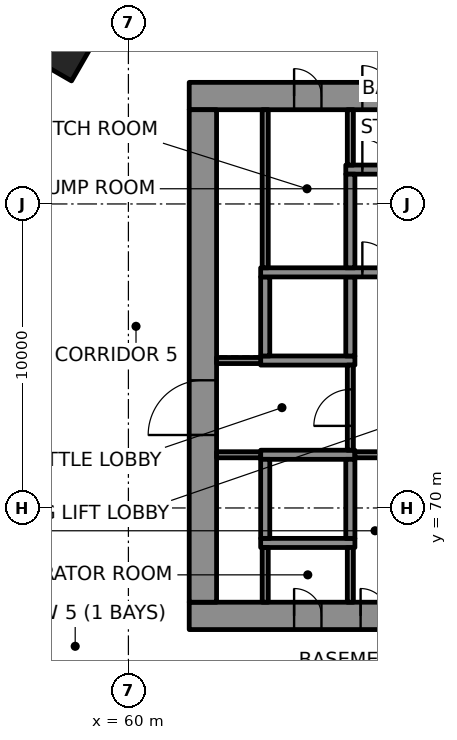
"""IFC4 building model, lengths in metres.
Left out: names, types, materials, properties, quantities, classifications, styles, units other than length and angle.
Written with IfcOpenShell. Run it as: python <this file> out.ifc"""

import sys

from ifc_helpers import new_model, si_unit, direction, frame, frame_2d, origin, origin_2d, place, context, subcontext, project, spatial, rectangle, extrude, element, fill, save


model = new_model("IFC4")
c1 = context("Model", 3, precision=1e-05, world=origin(), true_north=direction((0.0, 1.0)))
c2 = subcontext(c1, "Body", "Model", "MODEL_VIEW")
j1 = project(units=[si_unit("LENGTHUNIT", "METRE"), si_unit("PLANEANGLEUNIT", "RADIAN")], contexts=[c1])
p1 = place(None, origin())
s1 = spatial("IfcSite", under=j1, at=p1, CompositionType="ELEMENT")
p2 = place(p1, origin())
s2 = spatial("IfcBuilding", under=s1, at=p2, CompositionType="ELEMENT")
p3 = place(p2, frame((0.0, 0.0, -5.0)))
s3 = spatial("IfcBuildingStorey", under=s2, at=p3, CompositionType="ELEMENT", Elevation=-5.0)
p4 = place(p3, frame((67.936, 110.334, -0.35), z_axis=(0.0, 0.0, 1.0), x_axis=(-0.499999089162, -0.866025929656, 0.0)))
e1 = element("IfcWall", 1, at=p4, inside=s3, PredefinedType="SOLIDWALL", context=c2, shape_type="SweptSolid", body=[
    extrude(rectangle(XDim=53.501, YDim=0.6, at=frame_2d((26.751, 0.0))), origin(), (0.0, 0.0, 1.0), 5.05),
])
p5 = place(p3, frame((57.78, 84.942, 0.0), z_axis=(0.0, 0.0, 1.0), x_axis=(-0.5, -0.866025403784, 0.0)))
e2 = element("IfcColumn", 2, at=p5, inside=s3, PredefinedType="COLUMN", context=c2, shape_type="SweptSolid", body=[
    extrude(rectangle(XDim=1.2, YDim=1.5, at=origin_2d()), origin(), (0.0, 0.0, 1.0), 5.0),
])
p6 = place(p3, frame((62.0, 66.45, 0.0), z_axis=(0.0, 0.0, 1.0), x_axis=(1.0, 0.0, 0.0)))
e3 = element("IfcWall", 3, at=p6, inside=s3, PredefinedType="SHEAR", context=c2, shape_type="SweptSolid", body=[
    extrude(rectangle(XDim=26.0, YDim=0.9, at=frame_2d((13.0, 0.0))), origin(), (0.0, 0.0, 1.0), 4.7),
])
p7 = place(p6, frame((3.45, 0.0, 0.0)))
e4 = element("IfcOpeningElement", 4, at=p7, cuts=e3, PredefinedType="OPENING", context=c2, shape_type="SweptSolid", body=[
    extrude(rectangle(XDim=0.9, YDim=2.1, at=frame_2d((0.45, 1.05))), frame((0.0, 0.46, 0.0), z_axis=(0.0, -1.0, 0.0), x_axis=(1.0, 0.0, 0.0)), (0.0, 0.0, 1.0), 0.92),
])
p8 = place(p6, frame((5.637, 0.0, 0.0)))
e5 = element("IfcOpeningElement", 5, at=p8, cuts=e3, PredefinedType="OPENING", context=c2, shape_type="SweptSolid", body=[
    extrude(rectangle(XDim=0.9, YDim=2.1, at=frame_2d((0.45, 1.05))), frame((0.0, 0.46, 0.0), z_axis=(0.0, -1.0, 0.0), x_axis=(1.0, 0.0, 0.0)), (0.0, 0.0, 1.0), 0.92),
])
p9 = place(p6, frame((7.212, 0.0, 0.0)))
e6 = element("IfcOpeningElement", 6, at=p9, cuts=e3, PredefinedType="OPENING", context=c2, shape_type="SweptSolid", body=[
    extrude(rectangle(XDim=0.9, YDim=2.1, at=frame_2d((0.45, 1.05))), frame((0.0, 0.46, 0.0), z_axis=(0.0, -1.0, 0.0), x_axis=(1.0, 0.0, 0.0)), (0.0, 0.0, 1.0), 0.92),
])
p10 = place(p6, frame((8.999, 0.0, 0.0)))
e7 = element("IfcOpeningElement", 7, at=p10, cuts=e3, PredefinedType="OPENING", context=c2, shape_type="SweptSolid", body=[
    extrude(rectangle(XDim=0.9, YDim=2.1, at=frame_2d((0.45, 1.05))), frame((0.0, 0.46, 0.0), z_axis=(0.0, -1.0, 0.0), x_axis=(1.0, 0.0, 0.0)), (0.0, 0.0, 1.0), 0.92),
])
p11 = place(p6, frame((17.324, 0.0, 0.0)))
e8 = element("IfcOpeningElement", 8, at=p11, cuts=e3, PredefinedType="OPENING", context=c2, shape_type="SweptSolid", body=[
    extrude(rectangle(XDim=0.9, YDim=2.1, at=frame_2d((0.45, 1.05))), frame((0.0, 0.46, 0.0), z_axis=(0.0, -1.0, 0.0), x_axis=(1.0, 0.0, 0.0)), (0.0, 0.0, 1.0), 0.92),
])
p12 = place(p3, frame((62.0, 83.55, 0.0), z_axis=(0.0, 0.0, 1.0), x_axis=(1.0, 0.0, 0.0)))
e9 = element("IfcWall", 9, at=p12, inside=s3, PredefinedType="SHEAR", context=c2, shape_type="SweptSolid", body=[
    extrude(rectangle(XDim=26.0, YDim=0.9, at=frame_2d((13.0, 0.0))), origin(), (0.0, 0.0, 1.0), 4.7),
])
p13 = place(p12, frame((5.695, 0.0, 0.0)))
e10 = element("IfcOpeningElement", 10, at=p13, cuts=e9, PredefinedType="OPENING", context=c2, shape_type="SweptSolid", body=[
    extrude(rectangle(XDim=1.0, YDim=2.1, at=frame_2d((0.5, 1.05))), frame((0.0, 0.46, 0.0), z_axis=(0.0, -1.0, 0.0), x_axis=(1.0, 0.0, 0.0)), (0.0, 0.0, 1.0), 0.92),
])
p14 = place(p12, frame((19.505, 0.0, 0.0)))
e11 = element("IfcOpeningElement", 11, at=p14, cuts=e9, PredefinedType="OPENING", context=c2, shape_type="SweptSolid", body=[
    extrude(rectangle(XDim=1.0, YDim=2.1, at=frame_2d((0.5, 1.05))), frame((0.0, 0.46, 0.0), z_axis=(0.0, -1.0, 0.0), x_axis=(1.0, 0.0, 0.0)), (0.0, 0.0, 1.0), 0.92),
])
p15 = place(p12, frame((3.45, 0.0, 0.0)))
e12 = element("IfcOpeningElement", 12, at=p15, cuts=e9, PredefinedType="OPENING", context=c2, shape_type="SweptSolid", body=[
    extrude(rectangle(XDim=0.9, YDim=2.1, at=frame_2d((0.45, 1.05))), frame((0.0, 0.46, 0.0), z_axis=(0.0, -1.0, 0.0), x_axis=(1.0, 0.0, 0.0)), (0.0, 0.0, 1.0), 0.92),
])
p16 = place(p12, frame((12.65, 0.0, 0.0)))
e13 = element("IfcOpeningElement", 13, at=p16, cuts=e9, PredefinedType="OPENING", context=c2, shape_type="SweptSolid", body=[
    extrude(rectangle(XDim=0.9, YDim=2.1, at=frame_2d((0.45, 1.05))), frame((0.0, 0.46, 0.0), z_axis=(0.0, -1.0, 0.0), x_axis=(1.0, 0.0, 0.0)), (0.0, 0.0, 1.0), 0.92),
])
p17 = place(p12, frame((22.55, 0.0, 0.0)))
e14 = element("IfcOpeningElement", 14, at=p17, cuts=e9, PredefinedType="OPENING", context=c2, shape_type="SweptSolid", body=[
    extrude(rectangle(XDim=0.9, YDim=2.1, at=frame_2d((0.45, 1.05))), frame((0.0, 0.46, 0.0), z_axis=(0.0, -1.0, 0.0), x_axis=(1.0, 0.0, 0.0)), (0.0, 0.0, 1.0), 0.92),
])
p18 = place(p3, frame((62.45, 66.9, 0.0), z_axis=(0.0, 0.0, 1.0), x_axis=(0.0, 1.0, 0.0)))
e15 = element("IfcWall", 15, at=p18, inside=s3, PredefinedType="SHEAR", context=c2, shape_type="SweptSolid", body=[
    extrude(rectangle(XDim=16.2, YDim=0.9, at=frame_2d((8.1, 0.0))), origin(), (0.0, 0.0, 1.0), 4.7),
])
p19 = place(p18, frame((5.5, 0.0, 0.0)))
e16 = element("IfcOpeningElement", 16, at=p19, cuts=e15, PredefinedType="OPENING", context=c2, shape_type="SweptSolid", body=[
    extrude(rectangle(XDim=1.8, YDim=2.1, at=frame_2d((0.9, 1.05))), frame((0.0, 0.46, 0.0), z_axis=(0.0, -1.0, 0.0), x_axis=(1.0, 0.0, 0.0)), (0.0, 0.0, 1.0), 0.92),
])
for number, where, z_axis, x_axis in (
    (17, (64.35, 68.85, 0.0), (0.0, 0.0, 1.0), (1.0, 0.0, 0.0)),
    (18, (64.35, 71.75, 0.0), (0.0, 0.0, 1.0), (1.0, 0.0, 0.0)),
    (19, (64.35, 74.85, 0.0), (0.0, 0.0, 1.0), (1.0, 0.0, 0.0)),
):
    element("IfcWall", number, at=place(p3, frame(where, z_axis=z_axis, x_axis=x_axis)), inside=s3, PredefinedType="SHEAR", context=c2, shape_type="SweptSolid", body=[
        extrude(rectangle(XDim=3.1, YDim=0.3, at=frame_2d((1.55, 0.0))), origin(), (0.0, 0.0, 1.0), 4.7),
    ])
for number, where, z_axis, x_axis in (
    (20, (64.5, 69.0, 0.0), (0.0, 0.0, 1.0), (0.0, 1.0, 0.0)),
    (21, (64.5, 75.0, 0.0), (0.0, 0.0, 1.0), (0.0, 1.0, 0.0)),
    (22, (67.3, 69.0, 0.0), (0.0, 0.0, 1.0), (0.0, 1.0, 0.0)),
    (23, (67.3, 75.0, 0.0), (0.0, 0.0, 1.0), (0.0, 1.0, 0.0)),
):
    element("IfcWall", number, at=place(p3, frame(where, z_axis=z_axis, x_axis=x_axis)), inside=s3, PredefinedType="SHEAR", context=c2, shape_type="SweptSolid", body=[
        extrude(rectangle(XDim=2.6, YDim=0.3, at=frame_2d((1.3, 0.0))), origin(), (0.0, 0.0, 1.0), 4.7),
    ])
p20 = place(p3, frame((64.35, 77.75, 0.0), z_axis=(0.0, 0.0, 1.0), x_axis=(1.0, 0.0, 0.0)))
e24 = element("IfcWall", 24, at=p20, inside=s3, PredefinedType="SHEAR", context=c2, shape_type="SweptSolid", body=[
    extrude(rectangle(XDim=22.75, YDim=0.3, at=frame_2d((11.375, 0.0))), origin(), (0.0, 0.0, 1.0), 4.7),
])
p21 = place(p20, frame((3.345, 0.0, 0.0)))
e25 = element("IfcOpeningElement", 25, at=p21, cuts=e24, PredefinedType="OPENING", context=c2, shape_type="SweptSolid", body=[
    extrude(rectangle(XDim=1.0, YDim=2.1, at=frame_2d((0.5, 1.05))), frame((0.0, 0.16, 0.0), z_axis=(0.0, -1.0, 0.0), x_axis=(1.0, 0.0, 0.0)), (0.0, 0.0, 1.0), 0.32),
])
p22 = place(p3, frame((67.15, 81.13, 0.0), z_axis=(0.0, 0.0, 1.0), x_axis=(1.0, 0.0, 0.0)))
e26 = element("IfcWall", 26, at=p22, inside=s3, PredefinedType="SHEAR", context=c2, shape_type="SweptSolid", body=[
    extrude(rectangle(XDim=6.91, YDim=0.3, at=frame_2d((3.455, 0.0))), origin(), (0.0, 0.0, 1.0), 4.7),
])
p23 = place(p22, frame((0.545, 0.0, 0.0)))
e27 = element("IfcOpeningElement", 27, at=p23, cuts=e26, PredefinedType="OPENING", context=c2, shape_type="SweptSolid", body=[
    extrude(rectangle(XDim=1.0, YDim=2.1, at=frame_2d((0.5, 1.05))), frame((0.0, 0.16, 0.0), z_axis=(0.0, -1.0, 0.0), x_axis=(1.0, 0.0, 0.0)), (0.0, 0.0, 1.0), 0.32),
])
p24 = place(p3, frame((67.3, 77.9, 0.0), z_axis=(0.0, 0.0, 1.0), x_axis=(0.0, 1.0, 0.0)))
e28 = element("IfcWall", 28, at=p24, inside=s3, PredefinedType="SHEAR", context=c2, shape_type="SweptSolid", body=[
    extrude(rectangle(XDim=3.08, YDim=0.3, at=frame_2d((1.54, 0.0))), origin(), (0.0, 0.0, 1.0), 4.7),
])
p25 = place(p3, frame((62.9, 71.75, 0.0), z_axis=(0.0, 0.0, 1.0), x_axis=(1.0, 0.0, 0.0)))
e29 = element("IfcWall", 29, at=p25, inside=s3, PredefinedType="PARTITIONING", context=c2, shape_type="SweptSolid", body=[
    extrude(rectangle(XDim=1.45, YDim=0.2, at=frame_2d((0.725, 0.0))), origin(), (0.0, 0.0, 1.0), 4.7),
])
p26 = place(p3, frame((67.45, 71.75, 0.0), z_axis=(0.0, 0.0, 1.0), x_axis=(1.0, 0.0, 0.0)))
e30 = element("IfcWall", 30, at=p26, inside=s3, PredefinedType="PARTITIONING", context=c2, shape_type="SweptSolid", body=[
    extrude(rectangle(XDim=2.85, YDim=0.2, at=frame_2d((1.425, 0.0))), origin(), (0.0, 0.0, 1.0), 4.7),
])
p27 = place(p3, frame((62.9, 74.85, 0.0), z_axis=(0.0, 0.0, 1.0), x_axis=(1.0, 0.0, 0.0)))
e31 = element("IfcWall", 31, at=p27, inside=s3, PredefinedType="PARTITIONING", context=c2, shape_type="SweptSolid", body=[
    extrude(rectangle(XDim=1.45, YDim=0.2, at=frame_2d((0.725, 0.0))), origin(), (0.0, 0.0, 1.0), 4.7),
])
p28 = place(p3, frame((64.5, 66.9, 0.0), z_axis=(0.0, 0.0, 1.0), x_axis=(0.0, 1.0, 0.0)))
e32 = element("IfcWall", 32, at=p28, inside=s3, PredefinedType="PARTITIONING", context=c2, shape_type="SweptSolid", body=[
    extrude(rectangle(XDim=1.8, YDim=0.2, at=frame_2d((0.9, 0.0))), origin(), (0.0, 0.0, 1.0), 4.7),
])
p29 = place(p3, frame((64.5, 77.9, 0.0), z_axis=(0.0, 0.0, 1.0), x_axis=(0.0, 1.0, 0.0)))
e33 = element("IfcWall", 33, at=p29, inside=s3, PredefinedType="PARTITIONING", context=c2, shape_type="SweptSolid", body=[
    extrude(rectangle(XDim=5.2, YDim=0.2, at=frame_2d((2.6, 0.0))), origin(), (0.0, 0.0, 1.0), 4.7),
])
p30 = place(p3, frame((67.3, 66.9, 0.0), z_axis=(0.0, 0.0, 1.0), x_axis=(0.0, 1.0, 0.0)))
e34 = element("IfcWall", 34, at=p30, inside=s3, PredefinedType="PARTITIONING", context=c2, shape_type="SweptSolid", body=[
    extrude(rectangle(XDim=1.8, YDim=0.2, at=frame_2d((0.9, 0.0))), origin(), (0.0, 0.0, 1.0), 4.7),
])
p31 = place(p3, frame((67.3, 71.9, 0.0), z_axis=(0.0, 0.0, 1.0), x_axis=(0.0, 1.0, 0.0)))
e35 = element("IfcWall", 35, at=p31, inside=s3, PredefinedType="PARTITIONING", context=c2, shape_type="SweptSolid", body=[
    extrude(rectangle(XDim=2.8, YDim=0.2, at=frame_2d((1.4, 0.0))), origin(), (0.0, 0.0, 1.0), 4.7),
])
p32 = place(p31, frame((0.8, 0.0, 0.0)))
e36 = element("IfcOpeningElement", 36, at=p32, cuts=e35, PredefinedType="OPENING", context=c2, shape_type="SweptSolid", body=[
    extrude(rectangle(XDim=1.2, YDim=2.1, at=frame_2d((0.6, 1.05))), frame((0.0, 0.11, 0.0), z_axis=(0.0, -1.0, 0.0), x_axis=(1.0, 0.0, 0.0)), (0.0, 0.0, 1.0), 0.22),
])
p33 = place(p3, frame((67.3, 81.28, 0.0), z_axis=(0.0, 0.0, 1.0), x_axis=(0.0, 1.0, 0.0)))
e37 = element("IfcWall", 37, at=p33, inside=s3, PredefinedType="PARTITIONING", context=c2, shape_type="SweptSolid", body=[
    extrude(rectangle(XDim=1.82, YDim=0.2, at=frame_2d((0.91, 0.0))), origin(), (0.0, 0.0, 1.0), 4.7),
])
p34 = place(p21, origin())
e38 = element("IfcDoor", 38, at=p34, inside=s3, OperationType="SINGLE_SWING_LEFT", PredefinedType="DOOR", context=c2, shape_type="SweptSolid", body=[
    extrude(rectangle(XDim=1.0, YDim=2.1, at=frame_2d((0.5, 1.05))), frame((0.0, 0.025, 0.0), z_axis=(0.0, -1.0, 0.0), x_axis=(1.0, 0.0, 0.0)), (0.0, 0.0, 1.0), 0.05),
])
fill(e25, e38)
p35 = place(p23, origin())
e39 = element("IfcDoor", 39, at=p35, inside=s3, OperationType="SINGLE_SWING_RIGHT", PredefinedType="DOOR", context=c2, shape_type="SweptSolid", body=[
    extrude(rectangle(XDim=1.0, YDim=2.1, at=frame_2d((0.5, 1.05))), frame((0.0, 0.025, 0.0), z_axis=(0.0, -1.0, 0.0), x_axis=(1.0, 0.0, 0.0)), (0.0, 0.0, 1.0), 0.05),
])
fill(e27, e39)
p36 = place(p13, origin())
e40 = element("IfcDoor", 40, at=p36, inside=s3, OperationType="SINGLE_SWING_LEFT", PredefinedType="DOOR", context=c2, shape_type="SweptSolid", body=[
    extrude(rectangle(XDim=1.0, YDim=2.1, at=frame_2d((0.5, 1.05))), frame((0.0, 0.17, 0.0), z_axis=(0.0, -1.0, 0.0), x_axis=(1.0, 0.0, 0.0)), (0.0, 0.0, 1.0), 0.34),
])
fill(e10, e40)
p37 = place(p32, origin())
e41 = element("IfcDoor", 41, at=p37, inside=s3, OperationType="SINGLE_SWING_RIGHT", PredefinedType="DOOR", context=c2, shape_type="SweptSolid", body=[
    extrude(rectangle(XDim=1.2, YDim=2.1, at=frame_2d((0.6, 1.05))), frame((0.0, 0.025, 0.0), z_axis=(0.0, -1.0, 0.0), x_axis=(1.0, 0.0, 0.0)), (0.0, 0.0, 1.0), 0.05),
])
fill(e36, e41)
p38 = place(p19, origin())
e42 = element("IfcDoor", 42, at=p38, inside=s3, OperationType="SINGLE_SWING_LEFT", PredefinedType="DOOR", context=c2, shape_type="SweptSolid", body=[
    extrude(rectangle(XDim=1.8, YDim=2.1, at=frame_2d((0.9, 1.05))), frame((0.0, 0.17, 0.0), z_axis=(0.0, -1.0, 0.0), x_axis=(1.0, 0.0, 0.0)), (0.0, 0.0, 1.0), 0.34),
])
fill(e16, e42)
p39 = place(p7, origin())
e43 = element("IfcDoor", 43, at=p39, inside=s3, OperationType="SINGLE_SWING_LEFT", PredefinedType="DOOR", context=c2, shape_type="SweptSolid", body=[
    extrude(rectangle(XDim=0.9, YDim=2.1, at=frame_2d((0.45, 1.05))), frame((0.0, 0.17, 0.0), z_axis=(0.0, -1.0, 0.0), x_axis=(1.0, 0.0, 0.0)), (0.0, 0.0, 1.0), 0.34),
])
fill(e4, e43)
p40 = place(p8, origin())
e44 = element("IfcDoor", 44, at=p40, inside=s3, OperationType="SINGLE_SWING_RIGHT", PredefinedType="DOOR", context=c2, shape_type="SweptSolid", body=[
    extrude(rectangle(XDim=0.9, YDim=2.1, at=frame_2d((0.45, 1.05))), frame((0.0, 0.17, 0.0), z_axis=(0.0, -1.0, 0.0), x_axis=(1.0, 0.0, 0.0)), (0.0, 0.0, 1.0), 0.34),
])
fill(e5, e44)
p41 = place(p15, origin())
e45 = element("IfcDoor", 45, at=p41, inside=s3, OperationType="SINGLE_SWING_RIGHT", PredefinedType="DOOR", context=c2, shape_type="SweptSolid", body=[
    extrude(rectangle(XDim=0.9, YDim=2.1, at=frame_2d((0.45, 1.05))), frame((0.0, 0.17, 0.0), z_axis=(0.0, -1.0, 0.0), x_axis=(1.0, 0.0, 0.0)), (0.0, 0.0, 1.0), 0.34),
])
fill(e12, e45)
save(model, sys.argv[1])
